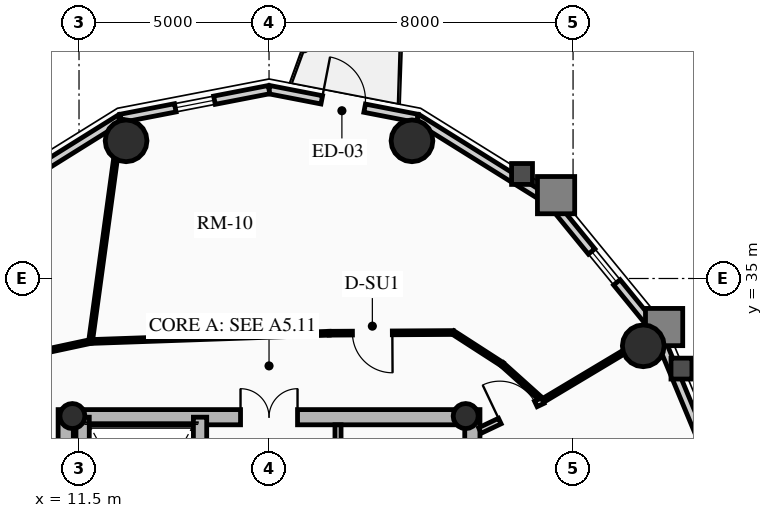
"""IFC4 building model, lengths in metres.
Left out: names, types, materials, properties, quantities, classifications, styles, units other than length and angle.
Written with IfcOpenShell. Run it as: python <this file> out.ifc"""

import sys

from ifc_helpers import new_model, si_unit, direction, frame, frame_2d, origin, origin_2d, place, context, subcontext, project, spatial, rectangle, circle, hollow_circle, extrude, source, transform, mapped, element, fill, save


model = new_model("IFC4")
c1 = context("Model", 3, precision=1e-05, world=origin(), true_north=direction((0.0, 1.0)))
c2 = subcontext(c1, "Body", "Model", "MODEL_VIEW")
j1 = project(units=[si_unit("LENGTHUNIT", "METRE"), si_unit("PLANEANGLEUNIT", "RADIAN")], contexts=[c1])
p1 = place(None, origin())
s1 = spatial("IfcSite", under=j1, at=p1, CompositionType="ELEMENT")
p2 = place(p1, origin())
s2 = spatial("IfcBuilding", under=s1, at=p2, CompositionType="ELEMENT")
p3 = place(p2, frame((0.0, 0.0, 196.66)))
s3 = spatial("IfcBuildingStorey", under=s2, at=p3, CompositionType="ELEMENT", Elevation=196.66)
for number, where, z_axis, x_axis in (
    (1, (11.15, 17.45, 0.0), (0.0, 0.0, 1.0), (0.0, 1.0, 0.0)),
    (2, (21.85, 17.45, 0.0), (0.0, 0.0, 1.0), (0.0, 1.0, 0.0)),
):
    element("IfcWall", number, at=place(p3, frame(where, z_axis=z_axis, x_axis=x_axis)), inside=s3, PredefinedType="SHEAR", context=c2, shape_type="SweptSolid", body=[
        extrude(rectangle(XDim=14.1, YDim=0.4, at=frame_2d((7.05, 0.0))), origin(), (0.0, 0.0, 1.0), 2.91),
    ])
p4 = place(p3, frame((11.15, 31.35, 0.0), z_axis=(0.0, 0.0, 1.0), x_axis=(1.0, 0.0, 0.0)))
e3 = element("IfcWall", 3, at=p4, inside=s3, PredefinedType="SHEAR", context=c2, shape_type="SweptSolid", body=[
    extrude(rectangle(XDim=10.7, YDim=0.4, at=frame_2d((5.35, 0.0))), origin(), (0.0, 0.0, 1.0), 2.91),
])
m1 = source(origin(), c2, "Body", "SweptSolid", [
    extrude(rectangle(XDim=1.5, YDim=2.02, at=frame_2d((0.75, 1.01))), frame((0.0, 0.21, 0.0), z_axis=(0.0, -1.0, 0.0), x_axis=(1.0, 0.0, 0.0)), (0.0, 0.0, 1.0), 0.42),
])
p5 = place(p4, frame((4.6, 0.0, 0.0)))
e4 = element("IfcOpeningElement", 4, at=p5, cuts=e3, PredefinedType="OPENING", context=c2, shape_type="MappedRepresentation", body=[
    mapped(m1, transform((0.0, 0.0, 0.0), x_axis=(1.0, 0.0, 0.0), y_axis=(0.0, 1.0, 0.0), z_axis=(0.0, 0.0, 1.0), scale=1.0)),
])
p6 = place(p3, frame((14.685, 17.65, 0.0), z_axis=(0.0, 0.0, 1.0), x_axis=(0.0, 1.0, 0.0)))
e5 = element("IfcWall", 5, at=p6, inside=s3, PredefinedType="SHEAR", context=c2, shape_type="SweptSolid", body=[
    extrude(rectangle(XDim=13.7, YDim=0.35, at=frame_2d((6.85, 0.0))), origin(), (0.0, 0.0, 1.0), 2.91),
])
m2 = source(origin(), c2, "Body", "SweptSolid", [
    extrude(rectangle(XDim=1.1, YDim=2.015, at=frame_2d((0.55, 1.007))), frame((0.0, 0.185, 0.0), z_axis=(0.0, -1.0, 0.0), x_axis=(1.0, 0.0, 0.0)), (0.0, 0.0, 1.0), 0.37),
])
p7 = place(p6, frame((4.85, 0.0, 0.0)))
e6 = element("IfcOpeningElement", 6, at=p7, cuts=e5, PredefinedType="OPENING", context=c2, shape_type="MappedRepresentation", body=[
    mapped(m2, transform((0.0, 0.0, 0.0), x_axis=(1.0, 0.0, 0.0), y_axis=(0.0, 1.0, 0.0), z_axis=(0.0, 0.0, 1.0), scale=1.0)),
])
p8 = place(p6, frame((0.625, 0.0, 0.0)))
e7 = element("IfcOpeningElement", 7, at=p8, cuts=e5, PredefinedType="OPENING", context=c2, shape_type="MappedRepresentation", body=[
    mapped(m2, transform((0.0, 0.0, 0.0), x_axis=(1.0, 0.0, 0.0), y_axis=(0.0, 1.0, 0.0), z_axis=(0.0, 0.0, 1.0), scale=1.0)),
])
p9 = place(p6, frame((2.625, 0.0, 0.0)))
e8 = element("IfcOpeningElement", 8, at=p9, cuts=e5, PredefinedType="OPENING", context=c2, shape_type="MappedRepresentation", body=[
    mapped(m2, transform((0.0, 0.0, 0.0), x_axis=(1.0, 0.0, 0.0), y_axis=(0.0, 1.0, 0.0), z_axis=(0.0, 0.0, 1.0), scale=1.0)),
])
m3 = source(origin(), c2, "Body", "SweptSolid", [
    extrude(rectangle(XDim=1.15, YDim=2.02, at=frame_2d((0.575, 1.01))), frame((0.0, 0.185, 0.0), z_axis=(0.0, -1.0, 0.0), x_axis=(1.0, 0.0, 0.0)), (0.0, 0.0, 1.0), 0.37),
])
p10 = place(p6, frame((7.27, 0.0, 0.0)))
e9 = element("IfcOpeningElement", 9, at=p10, cuts=e5, PredefinedType="OPENING", context=c2, shape_type="MappedRepresentation", body=[
    mapped(m3, transform((0.0, 0.0, 0.0), x_axis=(1.0, 0.0, 0.0), y_axis=(0.0, 1.0, 0.0), z_axis=(0.0, 0.0, 1.0), scale=1.0)),
])
p11 = place(p3, frame((11.595, 24.655, 0.0), z_axis=(0.0, 0.0, 1.0), x_axis=(0.0, 1.0, 0.0)))
e10 = element("IfcWall", 10, at=p11, inside=s3, PredefinedType="SHEAR", context=c2, shape_type="SweptSolid", body=[
    extrude(rectangle(XDim=6.695, YDim=0.35, at=frame_2d((3.348, 0.0))), origin(), (0.0, 0.0, 1.0), 2.91),
])
for number, where, z_axis, x_axis in (
    (11, (11.325, 31.38, 0.0), (0.0, 0.0, 1.0), (1.0, 0.0, 0.0)),
    (12, (21.675, 31.38, 0.0), (0.0, 0.0, 1.0), (1.0, 0.0, 0.0)),
):
    element("IfcColumn", number, at=place(p3, frame(where, z_axis=z_axis, x_axis=x_axis)), inside=s3, PredefinedType="COLUMN", context=c2, shape_type="SweptSolid", body=[
        extrude(hollow_circle(Radius=0.33, WallThickness=0.025, at=origin_2d()), origin(), (0.0, 0.0, 1.0), 2.91),
    ])
for number, where, z_axis, x_axis in (
    (13, (26.347, 33.229, 0.0), (0.0, 0.0, 1.0), (1.0, 0.0, 0.0)),
    (14, (20.261, 38.623, 0.0), (0.0, 0.0, 1.0), (1.0, 0.0, 0.0)),
    (15, (12.739, 38.623, 0.0), (0.0, 0.0, 1.0), (1.0, 0.0, 0.0)),
):
    element("IfcColumn", number, at=place(p3, frame(where, z_axis=z_axis, x_axis=x_axis)), inside=s3, PredefinedType="USERDEFINED", context=c2, shape_type="SweptSolid", body=[
        extrude(circle(Radius=0.55, at=origin_2d()), origin(), (0.0, 0.0, 1.0), 2.91),
    ])
p12 = place(p3, frame((26.718, 33.593, 0.0), z_axis=(0.0, 0.0, 1.0), x_axis=(0.384036305194, -0.923317993052, 0.0)))
e16 = element("IfcWall", 16, at=p12, inside=s3, PredefinedType="SOLIDWALL", context=c2, shape_type="SweptSolid", body=[
    extrude(rectangle(XDim=4.671, YDim=0.22, at=frame_2d((2.335, 0.0))), origin(), (0.0, 0.0, 1.0), 2.322),
])
p13 = place(p3, frame((23.924, 37.015, 0.0), z_axis=(0.0, 0.0, 1.0), x_axis=(0.632467166636, -0.774587169483, 0.0)))
e17 = element("IfcWall", 17, at=p13, inside=s3, PredefinedType="SOLIDWALL", context=c2, shape_type="SweptSolid", body=[
    extrude(rectangle(XDim=4.418, YDim=0.22, at=frame_2d((2.209, 0.0))), origin(), (0.0, 0.0, 1.0), 2.322),
])
m4 = source(origin(), c2, "Body", "SweptSolid", [
    extrude(rectangle(XDim=1.05, YDim=1.3, at=frame_2d((0.525, 0.65))), frame((0.0, 0.12, 0.0), z_axis=(0.0, -1.0, 0.0), x_axis=(1.0, 0.0, 0.0)), (0.0, 0.0, 1.0), 0.24),
])
p14 = place(p13, frame((1.684, 0.0, 0.65)))
e18 = element("IfcOpeningElement", 18, at=p14, cuts=e17, PredefinedType="OPENING", context=c2, shape_type="MappedRepresentation", body=[
    mapped(m4, transform((0.0, 0.0, 0.0), x_axis=(1.0, 0.0, 0.0), y_axis=(0.0, 1.0, 0.0), z_axis=(0.0, 0.0, 1.0), scale=1.0)),
])
p15 = place(p3, frame((20.403, 39.213, 0.0), z_axis=(0.0, 0.0, 1.0), x_axis=(0.848318713376, -0.529485939886, 0.0)))
e19 = element("IfcWall", 19, at=p15, inside=s3, PredefinedType="SOLIDWALL", context=c2, shape_type="SweptSolid", body=[
    extrude(rectangle(XDim=4.15, YDim=0.22, at=frame_2d((2.075, 0.0))), origin(), (0.0, 0.0, 1.0), 2.322),
])
p16 = place(p3, frame((16.5, 39.97, 0.0), z_axis=(0.0, 0.0, 1.0), x_axis=(0.981700307484, -0.190432419211, 0.0)))
e20 = element("IfcWall", 20, at=p16, inside=s3, PredefinedType="SOLIDWALL", context=c2, shape_type="SweptSolid", body=[
    extrude(rectangle(XDim=3.976, YDim=0.22, at=frame_2d((1.988, 0.0))), origin(), (0.0, 0.0, 1.0), 2.322),
])
m5 = source(origin(), c2, "Body", "SweptSolid", [
    extrude(rectangle(XDim=1.15, YDim=2.005, at=frame_2d((0.575, 1.002))), frame((0.0, 0.12, 0.0), z_axis=(0.0, -1.0, 0.0), x_axis=(1.0, 0.0, 0.0)), (0.0, 0.0, 1.0), 0.24),
])
p17 = place(p16, frame((1.413, 0.0, 0.0)))
e21 = element("IfcOpeningElement", 21, at=p17, cuts=e20, PredefinedType="OPENING", context=c2, shape_type="MappedRepresentation", body=[
    mapped(m5, transform((0.0, 0.0, 0.0), x_axis=(1.0, 0.0, 0.0), y_axis=(0.0, 1.0, 0.0), z_axis=(0.0, 0.0, 1.0), scale=1.0)),
])
p18 = place(p3, frame((12.597, 39.213, 0.0), z_axis=(0.0, 0.0, 1.0), x_axis=(0.981700307484, 0.190432419211, 0.0)))
e22 = element("IfcWall", 22, at=p18, inside=s3, PredefinedType="SOLIDWALL", context=c2, shape_type="SweptSolid", body=[
    extrude(rectangle(XDim=3.976, YDim=0.22, at=frame_2d((1.988, 0.0))), origin(), (0.0, 0.0, 1.0), 2.322),
])
p19 = place(p18, frame((1.463, 0.0, 0.65)))
e23 = element("IfcOpeningElement", 23, at=p19, cuts=e22, PredefinedType="OPENING", context=c2, shape_type="MappedRepresentation", body=[
    mapped(m4, transform((0.0, 0.0, 0.0), x_axis=(1.0, 0.0, 0.0), y_axis=(0.0, 1.0, 0.0), z_axis=(0.0, 0.0, 1.0), scale=1.0)),
])
p20 = place(p3, frame((9.076, 37.015, 0.0), z_axis=(0.0, 0.0, 1.0), x_axis=(0.848318713376, 0.529485939886, 0.0)))
e24 = element("IfcWall", 24, at=p20, inside=s3, PredefinedType="SOLIDWALL", context=c2, shape_type="SweptSolid", body=[
    extrude(rectangle(XDim=4.15, YDim=0.22, at=frame_2d((2.075, 0.0))), origin(), (0.0, 0.0, 1.0), 2.322),
])
p21 = place(p3, frame((18.315, 27.25, 0.0), z_axis=(0.0, 0.0, 1.0), x_axis=(0.0, 1.0, 0.0)))
e25 = element("IfcWall", 25, at=p21, inside=s3, PredefinedType="PARTITIONING", context=c2, shape_type="SweptSolid", body=[
    extrude(rectangle(XDim=3.9, YDim=0.16, at=frame_2d((1.95, 0.0))), origin(), (0.0, 0.0, 1.0), 2.685),
])
m6 = source(origin(), c2, "Body", "SweptSolid", [
    extrude(rectangle(XDim=0.9, YDim=2.005, at=frame_2d((0.45, 1.002))), frame((0.0, 0.09, 0.0), z_axis=(0.0, -1.0, 0.0), x_axis=(1.0, 0.0, 0.0)), (0.0, 0.0, 1.0), 0.18),
])
p22 = place(p21, frame((2.2, 0.0, 0.0)))
e26 = element("IfcOpeningElement", 26, at=p22, cuts=e25, PredefinedType="OPENING", context=c2, shape_type="MappedRepresentation", body=[
    mapped(m6, transform((0.0, 0.0, 0.0), x_axis=(1.0, 0.0, 0.0), y_axis=(0.0, 1.0, 0.0), z_axis=(0.0, 0.0, 1.0), scale=1.0)),
])
p23 = place(p3, frame((23.701, 31.786, 0.0), z_axis=(0.0, 0.0, 1.0), x_axis=(-0.743742806382, 0.668465883913, 0.0)))
e27 = element("IfcWall", 27, at=p23, inside=s3, PredefinedType="MOVABLE", context=c2, shape_type="SweptSolid", body=[
    extrude(rectangle(XDim=1.434, YDim=0.1, at=frame_2d((0.717, 0.0))), origin(), (0.0, 0.0, 1.0), 2.322),
])
p24 = place(p3, frame((22.635, 32.744, 0.0), z_axis=(0.0, 0.0, 1.0), x_axis=(-0.840119270642, 0.542401706391, 0.0)))
e28 = element("IfcWall", 28, at=p24, inside=s3, PredefinedType="MOVABLE", context=c2, shape_type="SweptSolid", body=[
    extrude(rectangle(XDim=1.538, YDim=0.1, at=frame_2d((0.769, 0.0))), origin(), (0.0, 0.0, 1.0), 2.255),
])
p25 = place(p3, frame((21.344, 33.578, 0.0), z_axis=(0.0, 0.0, 1.0), x_axis=(-0.999984243152, -0.005613684, 0.0)))
e29 = element("IfcWall", 29, at=p25, inside=s3, PredefinedType="MOVABLE", context=c2, shape_type="SweptSolid", body=[
    extrude(rectangle(XDim=3.262, YDim=0.1, at=frame_2d((1.631, 0.0))), origin(), (0.0, 0.0, 1.0), 2.322),
])
m7 = source(origin(), c2, "Body", "SweptSolid", [
    extrude(rectangle(XDim=1.05, YDim=2.015, at=frame_2d((0.525, 1.007))), frame((0.0, 0.06, 0.0), z_axis=(0.0, -1.0, 0.0), x_axis=(1.0, 0.0, 0.0)), (0.0, 0.0, 1.0), 0.12),
])
p26 = place(p25, frame((1.599, 0.0, 0.0)))
e30 = element("IfcOpeningElement", 30, at=p26, cuts=e29, PredefinedType="OPENING", context=c2, shape_type="MappedRepresentation", body=[
    mapped(m7, transform((0.0, 0.0, 0.0), x_axis=(1.0, 0.0, 0.0), y_axis=(0.0, 1.0, 0.0), z_axis=(0.0, 0.0, 1.0), scale=1.0)),
])
p27 = place(p3, frame((18.082, 33.56, 0.0), z_axis=(0.0, 0.0, 1.0), x_axis=(-0.999399009709, -0.034664382185, 0.0)))
e31 = element("IfcWall", 31, at=p27, inside=s3, PredefinedType="MOVABLE", context=c2, shape_type="SweptSolid", body=[
    extrude(rectangle(XDim=6.282, YDim=0.1, at=frame_2d((3.141, 0.0))), origin(), (0.0, 0.0, 1.0), 2.255),
])
p28 = place(p3, frame((11.803, 33.342, 0.0), z_axis=(0.0, 0.0, 1.0), x_axis=(-0.977750742783, -0.209770076483, 0.0)))
e32 = element("IfcWall", 32, at=p28, inside=s3, PredefinedType="MOVABLE", context=c2, shape_type="SweptSolid", body=[
    extrude(rectangle(XDim=1.868, YDim=0.1, at=frame_2d((0.934, 0.0))), origin(), (0.0, 0.0, 1.0), 2.255),
])
p29 = place(p3, frame((23.701, 31.786, 0.0), z_axis=(0.0, 0.0, 1.0), x_axis=(0.858059206709, 0.513550774298, 0.0)))
e33 = element("IfcWall", 33, at=p29, inside=s3, PredefinedType="MOVABLE", context=c2, shape_type="SweptSolid", body=[
    extrude(rectangle(XDim=3.497, YDim=0.1, at=frame_2d((1.748, 0.0))), origin(), (0.0, 0.0, 1.0), 2.322),
])
p30 = place(p3, frame((11.803, 33.342, 0.0), z_axis=(0.0, 0.0, 1.0), x_axis=(0.135452591041, 0.990783828885, 0.0)))
e34 = element("IfcWall", 34, at=p30, inside=s3, PredefinedType="MOVABLE", context=c2, shape_type="SweptSolid", body=[
    extrude(rectangle(XDim=5.906, YDim=0.1, at=frame_2d((2.953, 0.0))), origin(), (0.0, 0.0, 1.0), 2.322),
])
p31 = place(p3, frame((22.05, 31.0, 0.0), z_axis=(0.0, 0.0, 1.0), x_axis=(0.903013459407, 0.429612257891, 0.0)))
e35 = element("IfcWall", 35, at=p31, inside=s3, PredefinedType="PARTITIONING", context=c2, shape_type="SweptSolid", body=[
    extrude(rectangle(XDim=1.829, YDim=0.16, at=frame_2d((0.914, 0.0))), origin(), (0.0, 0.0, 1.0), 2.255),
])
m8 = source(origin(), c2, "Body", "SweptSolid", [
    extrude(rectangle(XDim=1.05, YDim=2.015, at=frame_2d((0.525, 1.007))), frame((0.0, 0.09, 0.0), z_axis=(0.0, -1.0, 0.0), x_axis=(1.0, 0.0, 0.0)), (0.0, 0.0, 1.0), 0.18),
])
p32 = place(p31, frame((0.579, 0.0, 0.0)))
e36 = element("IfcOpeningElement", 36, at=p32, cuts=e35, PredefinedType="OPENING", context=c2, shape_type="MappedRepresentation", body=[
    mapped(m8, transform((0.0, 0.0, 0.0), x_axis=(1.0, 0.0, 0.0), y_axis=(0.0, 1.0, 0.0), z_axis=(0.0, 0.0, 1.0), scale=1.0)),
])
m9 = source(origin(), c2, "Body", "SweptSolid", [
    extrude(rectangle(XDim=1.05, YDim=1.3, at=frame_2d((0.525, 0.65))), frame((0.0, 0.03, 0.0), z_axis=(0.0, -1.0, 0.0), x_axis=(1.0, 0.0, 0.0)), (0.0, 0.0, 1.0), 0.06),
])
p33 = place(p14, origin())
e37 = element("IfcWindow", 37, at=p33, inside=s3, PartitioningType="SINGLE_PANEL", PredefinedType="WINDOW", context=c2, shape_type="MappedRepresentation", body=[
    mapped(m9, transform((0.0, 0.0, 0.0), x_axis=(1.0, 0.0, 0.0), y_axis=(0.0, 1.0, 0.0), z_axis=(0.0, 0.0, 1.0), scale=1.0)),
])
fill(e18, e37)
m10 = source(origin(), c2, "Body", "SweptSolid", [
    extrude(rectangle(XDim=1.15, YDim=2.005, at=frame_2d((0.575, 1.002))), frame((0.0, 0.025, 0.0), z_axis=(0.0, -1.0, 0.0), x_axis=(1.0, 0.0, 0.0)), (0.0, 0.0, 1.0), 0.05),
])
p34 = place(p17, origin())
e38 = element("IfcDoor", 38, at=p34, inside=s3, OperationType="SINGLE_SWING_LEFT", PredefinedType="DOOR", context=c2, shape_type="MappedRepresentation", body=[
    mapped(m10, transform((0.0, 0.0, 0.0), x_axis=(1.0, 0.0, 0.0), y_axis=(0.0, 1.0, 0.0), z_axis=(0.0, 0.0, 1.0), scale=1.0)),
])
fill(e21, e38)
p35 = place(p19, origin())
e39 = element("IfcWindow", 39, at=p35, inside=s3, PartitioningType="SINGLE_PANEL", PredefinedType="WINDOW", context=c2, shape_type="MappedRepresentation", body=[
    mapped(m9, transform((0.0, 0.0, 0.0), x_axis=(1.0, 0.0, 0.0), y_axis=(0.0, 1.0, 0.0), z_axis=(0.0, 0.0, 1.0), scale=1.0)),
])
fill(e23, e39)
m11 = source(origin(), c2, "Body", "SweptSolid", [
    extrude(rectangle(XDim=1.5, YDim=2.02, at=frame_2d((0.75, 1.01))), frame((0.0, 0.025, 0.0), z_axis=(0.0, -1.0, 0.0), x_axis=(1.0, 0.0, 0.0)), (0.0, 0.0, 1.0), 0.05),
])
p36 = place(p5, origin())
e40 = element("IfcDoor", 40, at=p36, inside=s3, OperationType="DOUBLE_DOOR_SINGLE_SWING", PredefinedType="DOOR", context=c2, shape_type="MappedRepresentation", body=[
    mapped(m11, transform((0.0, 0.0, 0.0), x_axis=(1.0, 0.0, 0.0), y_axis=(0.0, 1.0, 0.0), z_axis=(0.0, 0.0, 1.0), scale=1.0)),
])
fill(e4, e40)
m12 = source(origin(), c2, "Body", "SweptSolid", [
    extrude(rectangle(XDim=1.05, YDim=2.015, at=frame_2d((0.525, 1.007))), frame((0.0, 0.025, 0.0), z_axis=(0.0, -1.0, 0.0), x_axis=(1.0, 0.0, 0.0)), (0.0, 0.0, 1.0), 0.05),
])
p37 = place(p32, origin())
e41 = element("IfcDoor", 41, at=p37, inside=s3, OperationType="SINGLE_SWING_LEFT", PredefinedType="DOOR", context=c2, shape_type="MappedRepresentation", body=[
    mapped(m12, transform((0.0, 0.0, 0.0), x_axis=(1.0, 0.0, 0.0), y_axis=(0.0, 1.0, 0.0), z_axis=(0.0, 0.0, 1.0), scale=1.0)),
])
fill(e36, e41)
p38 = place(p26, origin())
e42 = element("IfcDoor", 42, at=p38, inside=s3, OperationType="SINGLE_SWING_LEFT", PredefinedType="DOOR", context=c2, shape_type="MappedRepresentation", body=[
    mapped(m12, transform((0.0, 0.0, 0.0), x_axis=(1.0, 0.0, 0.0), y_axis=(0.0, 1.0, 0.0), z_axis=(0.0, 0.0, 1.0), scale=1.0)),
])
fill(e30, e42)
save(model, sys.argv[1])
